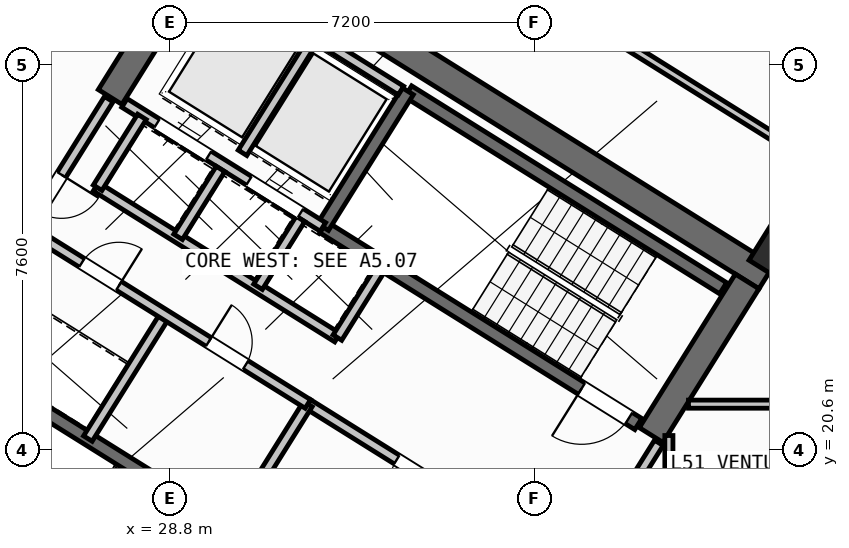
"""IFC4 building model, lengths in metres.
Left out: names, types, materials, properties, quantities, classifications, styles, units other than length and angle.
Written with IfcOpenShell. Run it as: python <this file> out.ifc"""

import sys

from ifc_helpers import new_model, si_unit, direction, frame, frame_2d, origin, origin_2d, place, context, subcontext, project, spatial, rectangle, hollow_rectangle, extrude, source, transform, mapped, element, fill, save


model = new_model("IFC4")
c1 = context("Model", 3, precision=1e-05, world=origin(), true_north=direction((0.0, 1.0)))
c2 = subcontext(c1, "Body", "Model", "MODEL_VIEW")
j1 = project(units=[si_unit("LENGTHUNIT", "METRE"), si_unit("PLANEANGLEUNIT", "RADIAN")], contexts=[c1])
p1 = place(None, origin())
s1 = spatial("IfcSite", under=j1, at=p1, CompositionType="ELEMENT")
p2 = place(p1, origin())
s2 = spatial("IfcBuilding", under=s1, at=p2, CompositionType="ELEMENT")
p3 = place(p2, frame((0.0, 0.0, 204.0)))
s3 = spatial("IfcBuildingStorey", under=s2, at=p3, CompositionType="ELEMENT", Elevation=204.0)
p4 = place(p3, frame((40.573, 24.01, 0.0), z_axis=(0.0, 0.0, 1.0), x_axis=(-0.848047359947, 0.529920442413, 0.0)))
e1 = element("IfcWall", 1, at=p4, inside=s3, PredefinedType="SHEAR", context=c2, shape_type="SweptSolid", body=[
    extrude(rectangle(XDim=13.14, YDim=0.55, at=frame_2d((6.57, 0.0))), origin(), (0.0, 0.0, 1.0), 3.35),
])
p5 = place(p3, frame((40.194, 23.922, 0.0), z_axis=(0.0, 0.0, 1.0), x_axis=(-0.529888438328, -0.848067357541, 0.0)))
e2 = element("IfcWall", 2, at=p5, inside=s3, PredefinedType="SHEAR", context=c2, shape_type="SweptSolid", body=[
    extrude(rectangle(XDim=3.575, YDim=0.55, at=frame_2d((1.788, 0.0))), origin(), (0.0, 0.0, 1.0), 3.35),
])
p6 = place(p3, frame((29.517, 30.594, 0.0), z_axis=(0.0, 0.0, 1.0), x_axis=(-0.529906864564, -0.848055844204, 0.0)))
e3 = element("IfcWall", 3, at=p6, inside=s3, PredefinedType="SHEAR", context=c2, shape_type="SweptSolid", body=[
    extrude(rectangle(XDim=3.575, YDim=0.55, at=frame_2d((1.788, 0.0))), origin(), (0.0, 0.0, 1.0), 3.35),
])
m1 = source(origin(), c2, "Body", "SweptSolid", [
    extrude(hollow_rectangle(XDim=0.8, YDim=0.8, WallThickness=0.032, at=origin_2d()), origin(), (0.0, 0.0, 1.0), 3.6),
])
p7 = place(p3, frame((40.783, 24.469, 0.0), z_axis=(0.0, 0.0, 1.0), x_axis=(-0.848048096156, 0.529919264233, 0.0)))
e4 = element("IfcColumn", 4, at=p7, inside=s3, PredefinedType="COLUMN", context=c2, shape_type="MappedRepresentation", body=[
    mapped(m1, transform((0.0, 0.0, 0.0), scale=1.0)),
])
p8 = place(p3, frame((31.76, 12.183, 0.0), z_axis=(0.0, 0.0, 1.0), x_axis=(-0.848047074256, 0.529920899612, 0.0)))
e5 = element("IfcWall", 5, at=p8, inside=s3, PredefinedType="STANDARD", context=c2, shape_type="SweptSolid", body=[
    extrude(rectangle(XDim=30.652, YDim=0.32, at=frame_2d((15.326, 0.0))), origin(), (0.0, 0.0, 1.0), 3.35),
])
p9 = place(p8, frame((15.166, 0.0, 0.0)))
e6 = element("IfcOpeningElement", 6, at=p9, cuts=e5, PredefinedType="OPENING", context=c2, shape_type="SweptSolid", body=[
    extrude(rectangle(XDim=1.2, YDim=2.15, at=frame_2d((0.6, 1.075))), frame((0.0, 0.17, 0.0), z_axis=(0.0, -1.0, 0.0), x_axis=(1.0, 0.0, 0.0)), (0.0, 0.0, 1.0), 0.34),
])
p10 = place(p8, frame((2.24, 0.0, 0.9)))
e7 = element("IfcOpeningElement", 7, at=p10, cuts=e5, PredefinedType="OPENING", context=c2, shape_type="SweptSolid", body=[
    extrude(rectangle(XDim=1.65, YDim=1.45, at=frame_2d((0.825, 0.725))), frame((0.0, 0.17, 0.0), z_axis=(0.0, -1.0, 0.0), x_axis=(1.0, 0.0, 0.0)), (0.0, 0.0, 1.0), 0.34),
])
p11 = place(p8, frame((7.469, 0.0, 0.9)))
e8 = element("IfcOpeningElement", 8, at=p11, cuts=e5, PredefinedType="OPENING", context=c2, shape_type="SweptSolid", body=[
    extrude(rectangle(XDim=1.65, YDim=1.45, at=frame_2d((0.825, 0.725))), frame((0.0, 0.17, 0.0), z_axis=(0.0, -1.0, 0.0), x_axis=(1.0, 0.0, 0.0)), (0.0, 0.0, 1.0), 0.34),
])
p12 = place(p8, frame((12.623, 0.0, 1.0)))
e9 = element("IfcOpeningElement", 9, at=p12, cuts=e5, PredefinedType="OPENING", context=c2, shape_type="SweptSolid", body=[
    extrude(rectangle(XDim=0.9, YDim=1.25, at=frame_2d((0.45, 0.625))), frame((0.0, 0.17, 0.0), z_axis=(0.0, -1.0, 0.0), x_axis=(1.0, 0.0, 0.0)), (0.0, 0.0, 1.0), 0.34),
])
p13 = place(p8, frame((19.556, 0.0, 1.0)))
e10 = element("IfcOpeningElement", 10, at=p13, cuts=e5, PredefinedType="OPENING", context=c2, shape_type="SweptSolid", body=[
    extrude(rectangle(XDim=0.9, YDim=1.25, at=frame_2d((0.45, 0.625))), frame((0.0, 0.17, 0.0), z_axis=(0.0, -1.0, 0.0), x_axis=(1.0, 0.0, 0.0)), (0.0, 0.0, 1.0), 0.34),
])
p14 = place(p8, frame((21.95, 0.0, 1.0)))
e11 = element("IfcOpeningElement", 11, at=p14, cuts=e5, PredefinedType="OPENING", context=c2, shape_type="SweptSolid", body=[
    extrude(rectangle(XDim=0.9, YDim=1.25, at=frame_2d((0.45, 0.625))), frame((0.0, 0.17, 0.0), z_axis=(0.0, -1.0, 0.0), x_axis=(1.0, 0.0, 0.0)), (0.0, 0.0, 1.0), 0.34),
])
p15 = place(p8, frame((26.983, 0.0, 0.9)))
e12 = element("IfcOpeningElement", 12, at=p15, cuts=e5, PredefinedType="OPENING", context=c2, shape_type="SweptSolid", body=[
    extrude(rectangle(XDim=1.35, YDim=1.45, at=frame_2d((0.675, 0.725))), frame((0.0, 0.17, 0.0), z_axis=(0.0, -1.0, 0.0), x_axis=(1.0, 0.0, 0.0)), (0.0, 0.0, 1.0), 0.34),
])
p16 = place(p3, frame((31.28, 18.261, 0.0), z_axis=(0.0, 0.0, 1.0), x_axis=(-0.848051618787, 0.529913626805, 0.0)))
e13 = element("IfcWall", 13, at=p16, inside=s3, PredefinedType="SHEAR", context=c2, shape_type="SweptSolid", body=[
    extrude(rectangle(XDim=7.46, YDim=0.26, at=frame_2d((3.73, 0.0))), origin(), (0.0, 0.0, 1.0), 3.35),
])
p17 = place(p16, frame((0.36, 0.0, 0.0)))
e14 = element("IfcOpeningElement", 14, at=p17, cuts=e13, PredefinedType="OPENING", context=c2, shape_type="SweptSolid", body=[
    extrude(rectangle(XDim=0.86, YDim=2.05, at=frame_2d((0.43, 1.025))), frame((0.0, 0.14, 0.0), z_axis=(0.0, -1.0, 0.0), x_axis=(1.0, 0.0, 0.0)), (0.0, 0.0, 1.0), 0.28),
])
p18 = place(p3, frame((39.721, 23.788, 0.0), z_axis=(0.0, 0.0, 1.0), x_axis=(-0.848054434086, 0.529909121291, 0.0)))
e15 = element("IfcWall", 15, at=p18, inside=s3, PredefinedType="SHEAR", context=c2, shape_type="SweptSolid", body=[
    extrude(rectangle(XDim=7.33, YDim=0.26, at=frame_2d((3.665, 0.0))), origin(), (0.0, 0.0, 1.0), 3.35),
])
p19 = place(p3, frame((38.046, 21.108, 0.0), z_axis=(0.0, 0.0, 1.0), x_axis=(-0.848054434086, 0.529909121291, 0.0)))
e16 = element("IfcWall", 16, at=p19, inside=s3, PredefinedType="SHEAR", context=c2, shape_type="SweptSolid", body=[
    extrude(rectangle(XDim=7.33, YDim=0.26, at=frame_2d((3.665, 0.0))), origin(), (0.0, 0.0, 1.0), 3.35),
])
p20 = place(p19, frame((0.22, 0.0, 0.0)))
e17 = element("IfcOpeningElement", 17, at=p20, cuts=e16, PredefinedType="OPENING", context=c2, shape_type="SweptSolid", body=[
    extrude(rectangle(XDim=1.1, YDim=2.1, at=frame_2d((0.55, 1.05))), frame((0.0, 0.14, 0.0), z_axis=(0.0, -1.0, 0.0), x_axis=(1.0, 0.0, 0.0)), (0.0, 0.0, 1.0), 0.28),
])
p21 = place(p3, frame((33.496, 27.677, 0.0), z_axis=(0.0, 0.0, 1.0), x_axis=(-0.529908658664, -0.84805472316, 0.0)))
e18 = element("IfcWall", 18, at=p21, inside=s3, PredefinedType="SHEAR", context=c2, shape_type="SweptSolid", body=[
    extrude(rectangle(XDim=3.16, YDim=0.26, at=frame_2d((1.58, 0.0))), origin(), (0.0, 0.0, 1.0), 3.35),
])
p22 = place(p3, frame((36.417, 18.447, 0.0), z_axis=(0.0, 0.0, 1.0), x_axis=(-0.848064879198, 0.529892404805, 0.0)))
e19 = element("IfcWall", 19, at=p22, inside=s3, PredefinedType="STANDARD", context=c2, shape_type="SweptSolid", body=[
    extrude(rectangle(XDim=5.768, YDim=0.2, at=frame_2d((2.884, 0.0))), origin(), (0.0, 0.0, 1.0), 3.34),
])
p23 = place(p22, frame((2.548, 0.0, 0.0)))
e20 = element("IfcOpeningElement", 20, at=p23, cuts=e19, PredefinedType="OPENING", context=c2, shape_type="SweptSolid", body=[
    extrude(rectangle(XDim=1.15, YDim=2.1, at=frame_2d((0.575, 1.05))), frame((0.0, 0.11, 0.0), z_axis=(0.0, -1.0, 0.0), x_axis=(1.0, 0.0, 0.0)), (0.0, 0.0, 1.0), 0.22),
])
p24 = place(p3, frame((31.822, 24.998, 0.0), z_axis=(0.0, 0.0, 1.0), x_axis=(-0.848036912365, 0.52993716162, 0.0)))
e21 = element("IfcWall", 21, at=p24, inside=s3, PredefinedType="STANDARD", context=c2, shape_type="SweptSolid", body=[
    extrude(rectangle(XDim=4.618, YDim=0.2, at=frame_2d((2.309, 0.0))), origin(), (0.0, 0.0, 1.0), 3.34),
])
p25 = place(p24, frame((0.52, 0.0, 0.0)))
e22 = element("IfcOpeningElement", 22, at=p25, cuts=e21, PredefinedType="OPENING", context=c2, shape_type="SweptSolid", body=[
    extrude(rectangle(XDim=1.2, YDim=2.15, at=frame_2d((0.6, 1.075))), frame((0.0, 0.11, 0.0), z_axis=(0.0, -1.0, 0.0), x_axis=(1.0, 0.0, 0.0)), (0.0, 0.0, 1.0), 0.22),
])
p26 = place(p24, frame((2.66, 0.0, 0.0)))
e23 = element("IfcOpeningElement", 23, at=p26, cuts=e21, PredefinedType="OPENING", context=c2, shape_type="SweptSolid", body=[
    extrude(rectangle(XDim=1.2, YDim=2.15, at=frame_2d((0.6, 1.075))), frame((0.0, 0.11, 0.0), z_axis=(0.0, -1.0, 0.0), x_axis=(1.0, 0.0, 0.0)), (0.0, 0.0, 1.0), 0.22),
])
p27 = place(p3, frame((32.108, 22.814, 0.0), z_axis=(0.0, 0.0, 1.0), x_axis=(-0.848042229521, 0.529928652696, 0.0)))
e24 = element("IfcWall", 24, at=p27, inside=s3, PredefinedType="STANDARD", context=c2, shape_type="SweptSolid", body=[
    extrude(rectangle(XDim=5.62, YDim=0.2, at=frame_2d((2.81, 0.0))), origin(), (0.0, 0.0, 1.0), 3.34),
])
p28 = place(p3, frame((32.982, 24.213, 0.0), z_axis=(0.0, 0.0, 1.0), x_axis=(-0.529839334948, -0.84809803628, 0.0)))
e25 = element("IfcWall", 25, at=p28, inside=s3, PredefinedType="STANDARD", context=c2, shape_type="SweptSolid", body=[
    extrude(rectangle(XDim=1.65, YDim=0.2, at=frame_2d((0.825, 0.0))), origin(), (0.0, 0.0, 1.0), 3.34),
])
p29 = place(p3, frame((28.25, 27.17, 0.0), z_axis=(0.0, 0.0, 1.0), x_axis=(-0.529905827651, -0.848056492117, 0.0)))
e26 = element("IfcWall", 26, at=p29, inside=s3, PredefinedType="STANDARD", context=c2, shape_type="SweptSolid", body=[
    extrude(rectangle(XDim=1.65, YDim=0.2, at=frame_2d((0.825, 0.0))), origin(), (0.0, 0.0, 1.0), 3.34),
])
p30 = place(p3, frame((31.645, 28.716, 0.0), z_axis=(0.0, 0.0, 1.0), x_axis=(-0.52986693015, -0.848080795876, 0.0)))
e27 = element("IfcWall", 27, at=p30, inside=s3, PredefinedType="STANDARD", context=c2, shape_type="SweptSolid", body=[
    extrude(rectangle(XDim=2.66, YDim=0.2, at=frame_2d((1.33, 0.0))), origin(), (0.0, 0.0, 1.0), 3.34),
])
p31 = place(p3, frame((33.363, 27.69, 0.0), z_axis=(0.0, 0.0, 1.0), x_axis=(-0.848047090064, 0.529920874315, 0.0)))
e28 = element("IfcWall", 28, at=p31, inside=s3, PredefinedType="STANDARD", context=c2, shape_type="SweptSolid", body=[
    extrude(rectangle(XDim=4.498, YDim=0.2, at=frame_2d((2.249, 0.0))), origin(), (0.0, 0.0, 1.0), 3.34),
])
for number, where, z_axis, x_axis in (
    (29, (31.379, 25.156, 0.0), (0.0, 0.0, 1.0), (-0.53, -0.848, 0.0)),
    (30, (29.801, 26.142, 0.0), (0.0, 0.0, 1.0), (-0.53, -0.848, 0.0)),
):
    element("IfcWall", number, at=place(p3, frame(where, z_axis=z_axis, x_axis=x_axis)), inside=s3, PredefinedType="STANDARD", context=c2, shape_type="SweptSolid", body=[
        extrude(rectangle(XDim=1.58, YDim=0.2, at=frame_2d((0.79, 0.0))), origin(), (0.0, 0.0, 1.0), 3.34),
    ])
for number, where, z_axis, x_axis in (
    (31, (31.525, 21.504, 0.0), (0.0, 0.0, 1.0), (-0.53, -0.848, 0.0)),
    (32, (28.71, 23.263, 0.0), (0.0, 0.0, 1.0), (-0.53, -0.848, 0.0)),
):
    element("IfcWall", number, at=place(p3, frame(where, z_axis=z_axis, x_axis=x_axis)), inside=s3, PredefinedType="STANDARD", context=c2, shape_type="SweptSolid", body=[
        extrude(rectangle(XDim=2.88, YDim=0.2, at=frame_2d((1.44, 0.0))), origin(), (0.0, 0.0, 1.0), 3.34),
    ])
p32 = place(p3, frame((31.525, 21.504, 0.0), z_axis=(0.0, 0.0, 1.0), x_axis=(-0.848040211232, 0.529931882541, 0.0)))
e33 = element("IfcWall", 33, at=p32, inside=s3, PredefinedType="STANDARD", context=c2, shape_type="SweptSolid", body=[
    extrude(rectangle(XDim=6.218, YDim=0.2, at=frame_2d((3.109, 0.0))), origin(), (0.0, 0.0, 1.0), 3.34),
])
p33 = place(p32, frame((4.4, 0.0, 0.0)))
e34 = element("IfcOpeningElement", 34, at=p33, cuts=e33, PredefinedType="OPENING", context=c2, shape_type="SweptSolid", body=[
    extrude(rectangle(XDim=0.86, YDim=2.05, at=frame_2d((0.43, 1.025))), frame((0.0, 0.11, 0.0), z_axis=(0.0, -1.0, 0.0), x_axis=(1.0, 0.0, 0.0)), (0.0, 0.0, 1.0), 0.22),
])
p34 = place(p32, frame((1.45, 0.0, 0.0)))
e35 = element("IfcOpeningElement", 35, at=p34, cuts=e33, PredefinedType="OPENING", context=c2, shape_type="SweptSolid", body=[
    extrude(rectangle(XDim=0.86, YDim=2.05, at=frame_2d((0.43, 1.025))), frame((0.0, 0.11, 0.0), z_axis=(0.0, -1.0, 0.0), x_axis=(1.0, 0.0, 0.0)), (0.0, 0.0, 1.0), 0.22),
])
p35 = place(p3, frame((27.596, 27.52, 0.0), z_axis=(0.0, 0.0, 1.0), x_axis=(-0.529865479138, -0.848081702443, 0.0)))
e36 = element("IfcWall", 36, at=p35, inside=s3, PredefinedType="STANDARD", context=c2, shape_type="SweptSolid", body=[
    extrude(rectangle(XDim=2.96, YDim=0.2, at=frame_2d((1.48, 0.0))), origin(), (0.0, 0.0, 1.0), 3.34),
])
p36 = place(p35, frame((1.76, 0.0, 0.0)))
e37 = element("IfcOpeningElement", 37, at=p36, cuts=e36, PredefinedType="OPENING", context=c2, shape_type="SweptSolid", body=[
    extrude(rectangle(XDim=0.86, YDim=2.05, at=frame_2d((0.43, 1.025))), frame((0.0, 0.11, 0.0), z_axis=(0.0, -1.0, 0.0), x_axis=(1.0, 0.0, 0.0)), (0.0, 0.0, 1.0), 0.22),
])
p37 = place(p3, frame((31.239, 38.274, 0.0), z_axis=(0.0, 0.0, 1.0), x_axis=(-0.529918119251, -0.84804881162, 0.0)))
e38 = element("IfcWall", 38, at=p37, inside=s3, PredefinedType="PARTITIONING", context=c2, shape_type="SweptSolid", body=[
    extrude(rectangle(XDim=17.65, YDim=0.16, at=frame_2d((8.825, 0.0))), origin(), (0.0, 0.0, 1.0), 3.34),
])
p38 = place(p3, frame((29.161, 39.89, 0.0), z_axis=(0.0, 0.0, 1.0), x_axis=(-0.529915512424, -0.848050440535, 0.0)))
e39 = element("IfcWall", 39, at=p38, inside=s3, PredefinedType="PARTITIONING", context=c2, shape_type="SweptSolid", body=[
    extrude(rectangle(XDim=15.52, YDim=0.11, at=frame_2d((7.76, 0.0))), origin(), (0.0, 0.0, 1.0), 3.34),
])
p39 = place(p38, frame((7.345, 0.0, 0.0)))
e40 = element("IfcOpeningElement", 40, at=p39, cuts=e39, PredefinedType="OPENING", context=c2, shape_type="SweptSolid", body=[
    extrude(rectangle(XDim=0.92, YDim=2.08, at=frame_2d((0.46, 1.04))), frame((0.0, 0.065, 0.0), z_axis=(0.0, -1.0, 0.0), x_axis=(1.0, 0.0, 0.0)), (0.0, 0.0, 1.0), 0.13),
])
p40 = place(p3, frame((41.936, 26.012, 0.0), z_axis=(0.0, 0.0, 1.0), x_axis=(-0.848051154596, 0.529914369676, 0.0)))
e41 = element("IfcWall", 41, at=p40, inside=s3, PredefinedType="PARTITIONING", context=c2, shape_type="SweptSolid", body=[
    extrude(rectangle(XDim=15.57, YDim=0.16, at=frame_2d((7.785, 0.0))), origin(), (0.0, 0.0, 1.0), 3.34),
])
p41 = place(p40, frame((10.83, 0.0, 0.0)))
e42 = element("IfcOpeningElement", 42, at=p41, cuts=e41, PredefinedType="OPENING", context=c2, shape_type="SweptSolid", body=[
    extrude(rectangle(XDim=1.0, YDim=2.1, at=frame_2d((0.5, 1.05))), frame((0.0, 0.09, 0.0), z_axis=(0.0, -1.0, 0.0), x_axis=(1.0, 0.0, 0.0)), (0.0, 0.0, 1.0), 0.18),
])
p42 = place(p3, frame((38.451, 20.737, 0.0), z_axis=(0.0, 0.0, 1.0), x_axis=(-0.529924799939, -0.848044637038, 0.0)))
e43 = element("IfcWall", 43, at=p42, inside=s3, PredefinedType="STANDARD", context=c2, shape_type="SweptSolid", body=[
    extrude(rectangle(XDim=2.96, YDim=0.2, at=frame_2d((1.48, 0.0))), origin(), (0.0, 0.0, 1.0), 3.34),
])
p43 = place(p42, frame((1.46, 0.0, 0.0)))
e44 = element("IfcOpeningElement", 44, at=p43, cuts=e43, PredefinedType="OPENING", context=c2, shape_type="SweptSolid", body=[
    extrude(rectangle(XDim=0.86, YDim=2.05, at=frame_2d((0.43, 1.025))), frame((0.0, 0.11, 0.0), z_axis=(0.0, -1.0, 0.0), x_axis=(1.0, 0.0, 0.0)), (0.0, 0.0, 1.0), 0.22),
])
p44 = place(p3, frame((38.65, 17.93, 0.0), z_axis=(0.0, 0.0, 1.0), x_axis=(0.0, 1.0, 0.0)))
e45 = element("IfcWall", 45, at=p44, inside=s3, PredefinedType="PARTITIONING", context=c2, shape_type="SweptSolid", body=[
    extrude(rectangle(XDim=2.951, YDim=0.16, at=frame_2d((1.476, 0.0))), origin(), (0.0, 0.0, 1.0), 3.34),
])
p45 = place(p3, frame((39.037, 21.5, 0.0), z_axis=(0.0, 0.0, 1.0), x_axis=(1.0, 0.0, 0.0)))
e46 = element("IfcWall", 46, at=p45, inside=s3, PredefinedType="PARTITIONING", context=c2, shape_type="SweptSolid", body=[
    extrude(rectangle(XDim=7.215, YDim=0.16, at=frame_2d((3.607, 0.0))), origin(), (0.0, 0.0, 1.0), 3.34),
])
m2 = source(origin(), c2, "Body", "SweptSolid", [
    extrude(rectangle(XDim=1.1, YDim=2.1, at=frame_2d((0.55, 1.05))), frame((0.0, 0.025, 0.0), z_axis=(0.0, -1.0, 0.0), x_axis=(1.0, 0.0, 0.0)), (0.0, 0.0, 1.0), 0.05),
])
p46 = place(p20, origin())
e47 = element("IfcDoor", 47, at=p46, inside=s3, OperationType="SINGLE_SWING_RIGHT", PredefinedType="DOOR", context=c2, shape_type="MappedRepresentation", body=[
    mapped(m2, transform((0.0, 0.0, 0.0), scale=1.0)),
])
fill(e17, e47)
m3 = source(origin(), c2, "Body", "SweptSolid", [
    extrude(rectangle(XDim=1.15, YDim=2.1, at=frame_2d((0.575, 1.05))), frame((0.0, 0.025, 0.0), z_axis=(0.0, -1.0, 0.0), x_axis=(1.0, 0.0, 0.0)), (0.0, 0.0, 1.0), 0.05),
])
p47 = place(p23, origin())
e48 = element("IfcDoor", 48, at=p47, inside=s3, OperationType="SINGLE_SWING_LEFT", PredefinedType="DOOR", context=c2, shape_type="MappedRepresentation", body=[
    mapped(m3, transform((0.0, 0.0, 0.0), scale=1.0)),
])
fill(e20, e48)
m4 = source(origin(), c2, "Body", "SweptSolid", [
    extrude(rectangle(XDim=1.2, YDim=2.15, at=frame_2d((0.6, 1.075))), frame((0.0, 0.025, 0.0), z_axis=(0.0, -1.0, 0.0), x_axis=(1.0, 0.0, 0.0)), (0.0, 0.0, 1.0), 0.05),
])
p48 = place(p25, origin())
e49 = element("IfcDoor", 49, at=p48, inside=s3, OperationType="DOUBLE_DOOR_SLIDING", PredefinedType="DOOR", context=c2, shape_type="MappedRepresentation", body=[
    mapped(m4, transform((0.0, 0.0, 0.0), scale=1.0)),
])
fill(e22, e49)
p49 = place(p26, origin())
e50 = element("IfcDoor", 50, at=p49, inside=s3, OperationType="DOUBLE_DOOR_SLIDING", PredefinedType="DOOR", context=c2, shape_type="MappedRepresentation", body=[
    mapped(m4, transform((0.0, 0.0, 0.0), scale=1.0)),
])
fill(e23, e50)
m5 = source(origin(), c2, "Body", "SweptSolid", [
    extrude(rectangle(XDim=0.86, YDim=2.05, at=frame_2d((0.43, 1.025))), frame((0.0, 0.025, 0.0), z_axis=(0.0, -1.0, 0.0), x_axis=(1.0, 0.0, 0.0)), (0.0, 0.0, 1.0), 0.05),
])
p50 = place(p33, frame((0.86, 0.0, 0.0), z_axis=(0.0, 0.0, 1.0), x_axis=(-1.0, 0.0, 0.0)))
e51 = element("IfcDoor", 51, at=p50, inside=s3, OperationType="SINGLE_SWING_RIGHT", PredefinedType="DOOR", context=c2, shape_type="MappedRepresentation", body=[
    mapped(m5, transform((0.0, 0.0, 0.0), scale=1.0)),
])
fill(e34, e51)
p51 = place(p34, frame((0.86, 0.0, 0.0), z_axis=(0.0, 0.0, 1.0), x_axis=(-1.0, 0.0, 0.0)))
e52 = element("IfcDoor", 52, at=p51, inside=s3, OperationType="SINGLE_SWING_LEFT", PredefinedType="DOOR", context=c2, shape_type="MappedRepresentation", body=[
    mapped(m5, transform((0.0, 0.0, 0.0), scale=1.0)),
])
fill(e35, e52)
p52 = place(p36, origin())
e53 = element("IfcDoor", 53, at=p52, inside=s3, OperationType="SINGLE_SWING_LEFT", PredefinedType="DOOR", context=c2, shape_type="MappedRepresentation", body=[
    mapped(m5, transform((0.0, 0.0, 0.0), scale=1.0)),
])
fill(e37, e53)
save(model, sys.argv[1])
